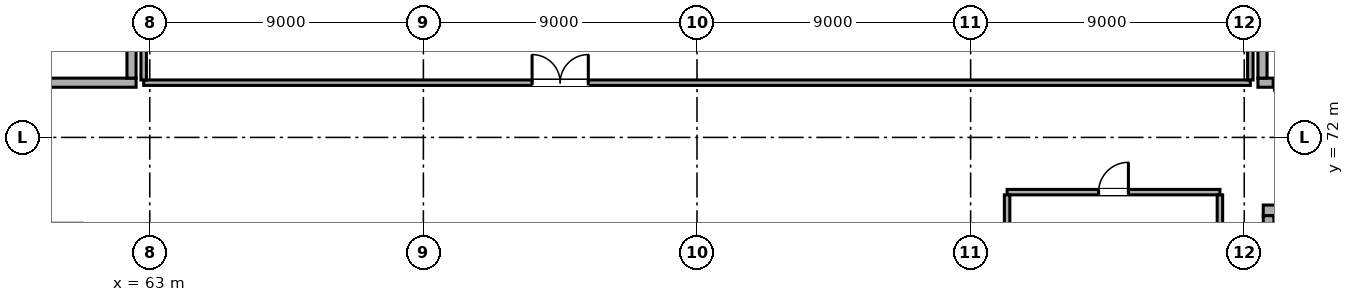
"""IFC4 building model, lengths in metres.
Left out: names, types, materials, properties, quantities, classifications, styles, units other than length and angle.
Written with IfcOpenShell. Run it as: python <this file> out.ifc"""

import sys

from ifc_helpers import new_model, si_unit, direction, frame, frame_2d, origin, origin_2d, place, context, subcontext, project, spatial, rectangle, hollow_rectangle, extrude, element, fill, save


model = new_model("IFC4")
c1 = context("Model", 3, precision=1e-05, world=origin(), true_north=direction((0.0, 1.0)))
c2 = subcontext(c1, "Body", "Model", "MODEL_VIEW")
j1 = project(units=[si_unit("LENGTHUNIT", "METRE"), si_unit("PLANEANGLEUNIT", "RADIAN")], contexts=[c1])
p1 = place(None, origin())
s1 = spatial("IfcSite", under=j1, at=p1, CompositionType="ELEMENT")
p2 = place(p1, origin())
s2 = spatial("IfcBuilding", under=s1, at=p2, CompositionType="ELEMENT")
p3 = place(p2, origin())
s3 = spatial("IfcBuildingStorey", under=s2, at=p3, CompositionType="ELEMENT", Elevation=0.0)
for number, where, z_axis, x_axis in (
    (1, (63.0, 72.0, 0.0), (0.0, 0.0, 1.0), (1.0, 0.0, 0.0)),
    (2, (72.0, 72.0, 0.0), (0.0, 0.0, 1.0), (1.0, 0.0, 0.0)),
    (3, (81.0, 72.0, 0.0), (0.0, 0.0, 1.0), (1.0, 0.0, 0.0)),
    (4, (90.0, 72.0, 0.0), (0.0, 0.0, 1.0), (1.0, 0.0, 0.0)),
    (5, (99.0, 72.0, 0.0), (0.0, 0.0, 1.0), (1.0, 0.0, 0.0)),
):
    element("IfcColumn", number, at=place(p3, frame(where, z_axis=z_axis, x_axis=x_axis)), inside=s3, PredefinedType="COLUMN", context=c2, shape_type="SweptSolid", body=[
        extrude(hollow_rectangle(XDim=0.65, YDim=0.65, WallThickness=0.025, at=origin_2d()), origin(), (0.0, 0.0, 1.0), 4.8),
    ])
p4 = place(p3, frame((54.45, 73.8, 0.0), z_axis=(0.0, 0.0, 1.0), x_axis=(1.0, 0.0, 0.0)))
e6 = element("IfcWall", 6, at=p4, inside=s3, PredefinedType="SHEAR", context=c2, shape_type="SweptSolid", body=[
    extrude(rectangle(XDim=8.1, YDim=0.3, at=frame_2d((4.05, 0.0))), origin(), (0.0, 0.0, 1.0), 4.555),
])
p5 = place(p4, frame((0.5, 0.0, 0.0)))
e7 = element("IfcOpeningElement", 7, at=p5, cuts=e6, PredefinedType="OPENING", context=c2, shape_type="SweptSolid", body=[
    extrude(rectangle(XDim=1.2, YDim=2.1, at=frame_2d((0.6, 1.05))), frame((0.0, 0.162, 0.0), z_axis=(0.0, -1.0, 0.0), x_axis=(1.0, 0.0, 0.0)), (0.0, 0.0, 1.0), 0.324),
])
p6 = place(p3, frame((62.4, 73.95, 0.0), z_axis=(0.0, 0.0, 1.0), x_axis=(0.0, 1.0, 0.0)))
e8 = element("IfcWall", 8, at=p6, inside=s3, PredefinedType="SHEAR", context=c2, shape_type="SweptSolid", body=[
    extrude(rectangle(XDim=3.8, YDim=0.3, at=frame_2d((1.9, 0.0))), origin(), (0.0, 0.0, 1.0), 4.555),
])
p7 = place(p3, frame((99.45, 73.8, 0.0), z_axis=(0.0, 0.0, 1.0), x_axis=(1.0, 0.0, 0.0)))
e9 = element("IfcWall", 9, at=p7, inside=s3, PredefinedType="SHEAR", context=c2, shape_type="SweptSolid", body=[
    extrude(rectangle(XDim=8.1, YDim=0.3, at=frame_2d((4.05, 0.0))), origin(), (0.0, 0.0, 1.0), 4.555),
])
p8 = place(p7, frame((0.5, 0.0, 0.0)))
e10 = element("IfcOpeningElement", 10, at=p8, cuts=e9, PredefinedType="OPENING", context=c2, shape_type="SweptSolid", body=[
    extrude(rectangle(XDim=1.2, YDim=2.1, at=frame_2d((0.6, 1.05))), frame((0.0, 0.162, 0.0), z_axis=(0.0, -1.0, 0.0), x_axis=(1.0, 0.0, 0.0)), (0.0, 0.0, 1.0), 0.324),
])
p9 = place(p3, frame((99.6, 73.95, 0.0), z_axis=(0.0, 0.0, 1.0), x_axis=(0.0, 1.0, 0.0)))
e11 = element("IfcWall", 11, at=p9, inside=s3, PredefinedType="SHEAR", context=c2, shape_type="SweptSolid", body=[
    extrude(rectangle(XDim=3.8, YDim=0.3, at=frame_2d((1.9, 0.0))), origin(), (0.0, 0.0, 1.0), 4.555),
])
p10 = place(p3, frame((99.625, 69.6, 0.0), z_axis=(0.0, 0.0, 1.0), x_axis=(1.0, 0.0, 0.0)))
e12 = element("IfcWall", 12, at=p10, inside=s3, PredefinedType="SHEAR", context=c2, shape_type="SweptSolid", body=[
    extrude(rectangle(XDim=2.95, YDim=0.35, at=frame_2d((1.475, 0.0))), origin(), (0.0, 0.0, 1.0), 4.555),
])
p11 = place(p10, frame((0.775, 0.0, 0.0)))
e13 = element("IfcOpeningElement", 13, at=p11, cuts=e12, PredefinedType="OPENING", context=c2, shape_type="SweptSolid", body=[
    extrude(rectangle(XDim=1.4, YDim=2.15, at=frame_2d((0.7, 1.075))), frame((0.0, 0.187, 0.0), z_axis=(0.0, -1.0, 0.0), x_axis=(1.0, 0.0, 0.0)), (0.0, 0.0, 1.0), 0.374),
])
p12 = place(p3, frame((99.8, 66.375, 0.0), z_axis=(0.0, 0.0, 1.0), x_axis=(0.0, 1.0, 0.0)))
e14 = element("IfcWall", 14, at=p12, inside=s3, PredefinedType="SHEAR", context=c2, shape_type="SweptSolid", body=[
    extrude(rectangle(XDim=3.05, YDim=0.35, at=frame_2d((1.525, 0.0))), origin(), (0.0, 0.0, 1.0), 4.555),
])
p13 = place(p3, frame((91.2, 70.2, 0.0), z_axis=(0.0, 0.0, 1.0), x_axis=(1.0, 0.0, 0.0)))
e15 = element("IfcWall", 15, at=p13, inside=s3, PredefinedType="PARTITIONING", context=c2, shape_type="SweptSolid", body=[
    extrude(rectangle(XDim=7.0, YDim=0.18, at=frame_2d((3.5, 0.0))), origin(), (0.0, 0.0, 1.0), 4.555),
])
p14 = place(p13, frame((3.01, 0.0, 0.0)))
e16 = element("IfcOpeningElement", 16, at=p14, cuts=e15, PredefinedType="OPENING", context=c2, shape_type="SweptSolid", body=[
    extrude(rectangle(XDim=0.98, YDim=2.02, at=frame_2d((0.49, 1.01))), frame((0.0, 0.102, 0.0), z_axis=(0.0, -1.0, 0.0), x_axis=(1.0, 0.0, 0.0)), (0.0, 0.0, 1.0), 0.204),
])
for number, where, z_axis, x_axis in (
    (17, (91.2, 68.09, 0.0), (0.0, 0.0, 1.0), (0.0, 1.0, 0.0)),
    (18, (98.2, 68.09, 0.0), (0.0, 0.0, 1.0), (0.0, 1.0, 0.0)),
):
    element("IfcWall", number, at=place(p3, frame(where, z_axis=z_axis, x_axis=x_axis)), inside=s3, PredefinedType="PARTITIONING", context=c2, shape_type="SweptSolid", body=[
        extrude(rectangle(XDim=2.02, YDim=0.18, at=frame_2d((1.01, 0.0))), origin(), (0.0, 0.0, 1.0), 4.555),
    ])
p15 = place(p3, frame((62.8, 73.8, 0.0), z_axis=(0.0, 0.0, 1.0), x_axis=(1.0, 0.0, 0.0)))
e19 = element("IfcWall", 19, at=p15, inside=s3, PredefinedType="PARTITIONING", context=c2, shape_type="SweptSolid", body=[
    extrude(rectangle(XDim=36.4, YDim=0.18, at=frame_2d((18.2, 0.0))), origin(), (0.0, 0.0, 1.0), 4.555),
])
p16 = place(p15, frame((12.775, 0.0, 0.0)))
e20 = element("IfcOpeningElement", 20, at=p16, cuts=e19, PredefinedType="OPENING", context=c2, shape_type="SweptSolid", body=[
    extrude(rectangle(XDim=1.85, YDim=2.12, at=frame_2d((0.925, 1.06))), frame((0.0, 0.102, 0.0), z_axis=(0.0, -1.0, 0.0), x_axis=(1.0, 0.0, 0.0)), (0.0, 0.0, 1.0), 0.204),
])
for number, where, z_axis, x_axis in (
    (21, (62.8, 73.89, 0.0), (0.0, 0.0, 1.0), (0.0, 1.0, 0.0)),
    (22, (99.2, 73.89, 0.0), (0.0, 0.0, 1.0), (0.0, 1.0, 0.0)),
):
    element("IfcWall", number, at=place(p3, frame(where, z_axis=z_axis, x_axis=x_axis)), inside=s3, PredefinedType="PARTITIONING", context=c2, shape_type="SweptSolid", body=[
        extrude(rectangle(XDim=11.42, YDim=0.18, at=frame_2d((5.71, 0.0))), origin(), (0.0, 0.0, 1.0), 3.835),
    ])
p17 = place(p8, frame((1.2, 0.0, 0.0), z_axis=(0.0, 0.0, 1.0), x_axis=(-1.0, 0.0, 0.0)))
e23 = element("IfcDoor", 23, at=p17, inside=s3, OperationType="SINGLE_SWING_LEFT", PredefinedType="DOOR", context=c2, shape_type="SweptSolid", body=[
    extrude(rectangle(XDim=1.2, YDim=2.1, at=frame_2d((0.6, 1.05))), frame((0.0, 0.025, 0.0), z_axis=(0.0, -1.0, 0.0), x_axis=(1.0, 0.0, 0.0)), (0.0, 0.0, 1.0), 0.05),
])
fill(e10, e23)
p18 = place(p14, origin())
e24 = element("IfcDoor", 24, at=p18, inside=s3, OperationType="SINGLE_SWING_RIGHT", PredefinedType="DOOR", context=c2, shape_type="SweptSolid", body=[
    extrude(rectangle(XDim=0.98, YDim=2.02, at=frame_2d((0.49, 1.01))), frame((0.0, 0.025, 0.0), z_axis=(0.0, -1.0, 0.0), x_axis=(1.0, 0.0, 0.0)), (0.0, 0.0, 1.0), 0.05),
])
fill(e16, e24)
p19 = place(p16, origin())
e25 = element("IfcDoor", 25, at=p19, inside=s3, OperationType="DOUBLE_DOOR_SINGLE_SWING", PredefinedType="DOOR", context=c2, shape_type="SweptSolid", body=[
    extrude(rectangle(XDim=1.85, YDim=2.12, at=frame_2d((0.925, 1.06))), frame((0.0, 0.025, 0.0), z_axis=(0.0, -1.0, 0.0), x_axis=(1.0, 0.0, 0.0)), (0.0, 0.0, 1.0), 0.05),
])
fill(e20, e25)
save(model, sys.argv[1])
